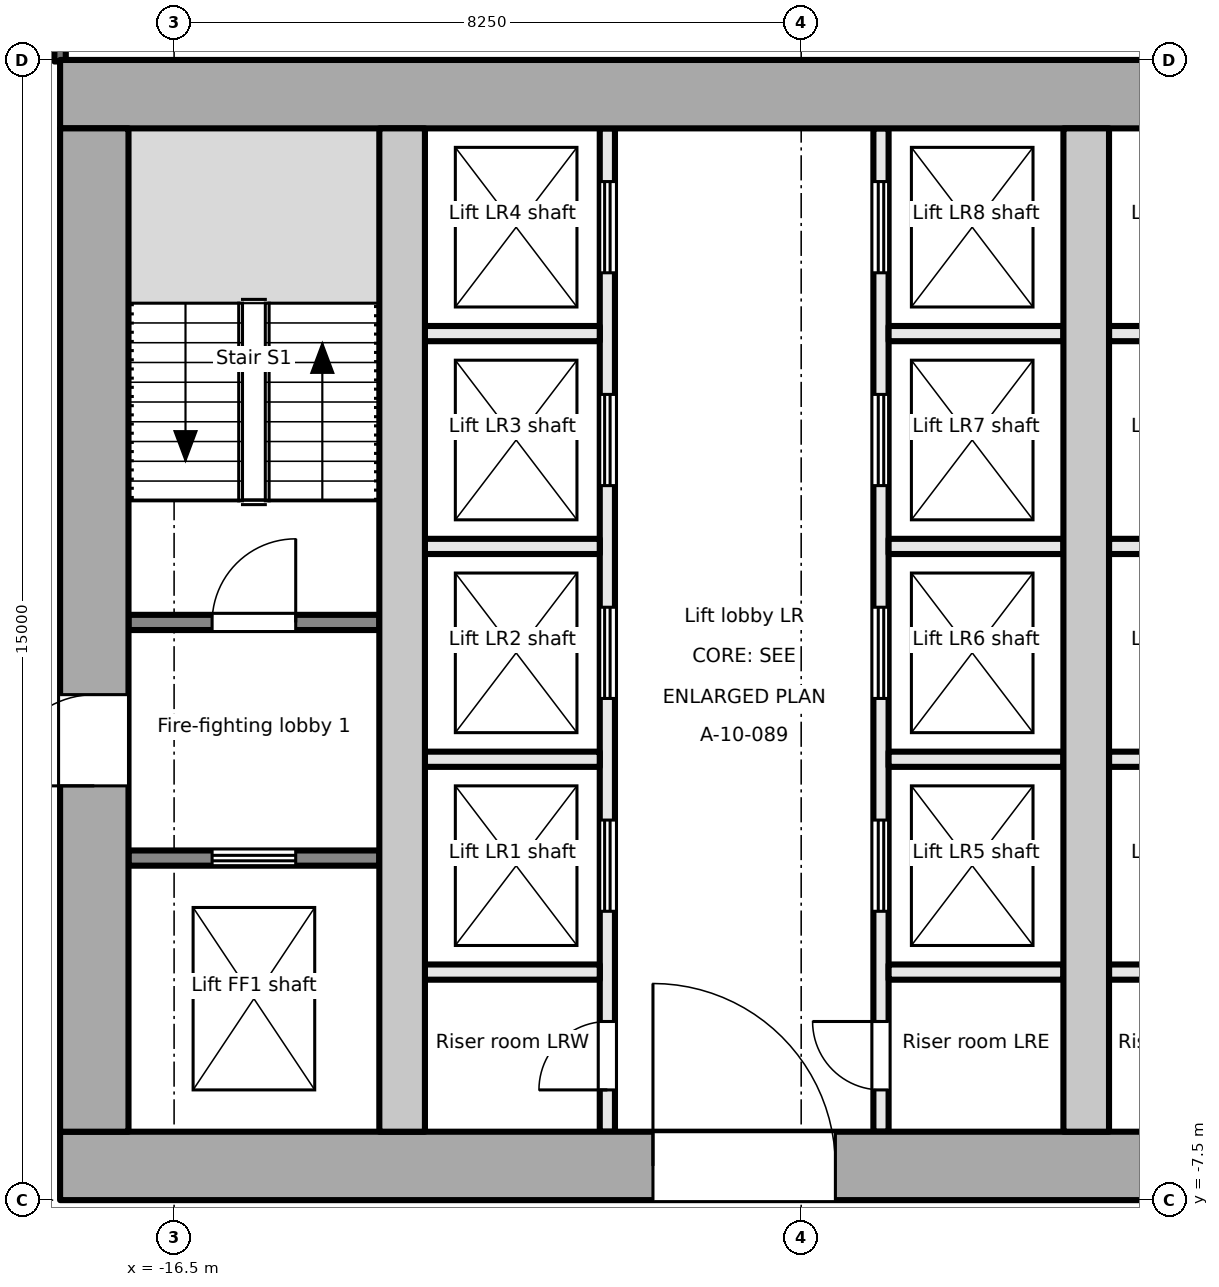
"""IFC4 building model, lengths in metres.
Left out: names, types, materials, properties, quantities, classifications, styles, units other than length and angle.
Written with IfcOpenShell. Run it as: python <this file> out.ifc"""

import sys

from ifc_helpers import new_model, si_unit, direction, frame, frame_2d, origin, place, context, subcontext, project, spatial, rectangle, extrude, element, fill, save


model = new_model("IFC4")
c1 = context("Model", 3, precision=1e-05, world=origin(), true_north=direction((0.0, 1.0)))
c2 = subcontext(c1, "Body", "Model", "MODEL_VIEW")
j1 = project(units=[si_unit("LENGTHUNIT", "METRE"), si_unit("PLANEANGLEUNIT", "RADIAN")], contexts=[c1])
p1 = place(None, origin())
s1 = spatial("IfcSite", under=j1, at=p1, CompositionType="ELEMENT")
p2 = place(p1, origin())
s2 = spatial("IfcBuilding", under=s1, at=p2, CompositionType="ELEMENT")
p3 = place(p2, frame((0.0, 0.0, 57.0)))
s3 = spatial("IfcBuildingStorey", under=s2, at=p3, CompositionType="ELEMENT", Elevation=57.0)
p4 = place(p3, frame((-18.0, -7.05, -0.2), z_axis=(0.0, 0.0, 1.0), x_axis=(1.0, 0.0, 0.0)))
e1 = element("IfcWall", 1, at=p4, inside=s3, PredefinedType="SHEAR", context=c2, shape_type="SweptSolid", body=[
    extrude(rectangle(XDim=36.0, YDim=0.9, at=frame_2d((18.0, 0.0))), origin(), (0.0, 0.0, 1.0), 4.1),
])
p5 = place(p4, frame((7.8, 0.0, 0.2)))
e2 = element("IfcOpeningElement", 2, at=p5, cuts=e1, PredefinedType="OPENING", context=c2, shape_type="SweptSolid", body=[
    extrude(rectangle(XDim=2.4, YDim=2.1, at=frame_2d((1.2, 1.05))), frame((0.0, 0.46, 0.0), z_axis=(0.0, -1.0, 0.0), x_axis=(1.0, 0.0, 0.0)), (0.0, 0.0, 1.0), 0.921),
])
p6 = place(p4, frame((17.4, 0.0, 0.2)))
e3 = element("IfcOpeningElement", 3, at=p6, cuts=e1, PredefinedType="OPENING", context=c2, shape_type="SweptSolid", body=[
    extrude(rectangle(XDim=1.2, YDim=2.1, at=frame_2d((0.6, 1.05))), frame((0.0, 0.46, 0.0), z_axis=(0.0, -1.0, 0.0), x_axis=(1.0, 0.0, 0.0)), (0.0, 0.0, 1.0), 0.921),
])
p7 = place(p4, frame((26.1, 0.0, 0.2)))
e4 = element("IfcOpeningElement", 4, at=p7, cuts=e1, PredefinedType="OPENING", context=c2, shape_type="SweptSolid", body=[
    extrude(rectangle(XDim=2.4, YDim=2.1, at=frame_2d((1.2, 1.05))), frame((0.0, 0.46, 0.0), z_axis=(0.0, -1.0, 0.0), x_axis=(1.0, 0.0, 0.0)), (0.0, 0.0, 1.0), 0.921),
])
p8 = place(p3, frame((-18.0, 7.05, -0.2), z_axis=(0.0, 0.0, 1.0), x_axis=(1.0, 0.0, 0.0)))
e5 = element("IfcWall", 5, at=p8, inside=s3, PredefinedType="SHEAR", context=c2, shape_type="SweptSolid", body=[
    extrude(rectangle(XDim=36.0, YDim=0.9, at=frame_2d((18.0, 0.0))), origin(), (0.0, 0.0, 1.0), 4.1),
])
p9 = place(p3, frame((-17.55, -6.6, -0.2), z_axis=(0.0, 0.0, 1.0), x_axis=(0.0, 1.0, 0.0)))
e6 = element("IfcWall", 6, at=p9, inside=s3, PredefinedType="SHEAR", context=c2, shape_type="SweptSolid", body=[
    extrude(rectangle(XDim=13.2, YDim=0.9, at=frame_2d((6.6, 0.0))), origin(), (0.0, 0.0, 1.0), 4.1),
])
p10 = place(p9, frame((4.55, 0.0, 0.2)))
e7 = element("IfcOpeningElement", 7, at=p10, cuts=e6, PredefinedType="OPENING", context=c2, shape_type="SweptSolid", body=[
    extrude(rectangle(XDim=1.2, YDim=2.1, at=frame_2d((0.6, 1.05))), frame((0.0, 0.46, 0.0), z_axis=(0.0, -1.0, 0.0), x_axis=(1.0, 0.0, 0.0)), (0.0, 0.0, 1.0), 0.921),
])
for number, where, z_axis, x_axis in (
    (8, (-13.5, -6.6, -0.2), (0.0, 0.0, 1.0), (0.0, 1.0, 0.0)),
    (9, (-4.5, -6.6, -0.2), (0.0, 0.0, 1.0), (0.0, 1.0, 0.0)),
):
    element("IfcWall", number, at=place(p3, frame(where, z_axis=z_axis, x_axis=x_axis)), inside=s3, PredefinedType="SHEAR", context=c2, shape_type="SweptSolid", body=[
        extrude(rectangle(XDim=13.2, YDim=0.6, at=frame_2d((6.6, 0.0))), origin(), (0.0, 0.0, 1.0), 4.1),
    ])
p11 = place(p3, frame((-17.1, -3.0, 0.0), z_axis=(0.0, 0.0, 1.0), x_axis=(1.0, 0.0, 0.0)))
e10 = element("IfcWall", 10, at=p11, inside=s3, PredefinedType="PARTITIONING", context=c2, shape_type="SweptSolid", body=[
    extrude(rectangle(XDim=3.3, YDim=0.2, at=frame_2d((1.65, 0.0))), origin(), (0.0, 0.0, 1.0), 3.9),
])
p12 = place(p11, frame((1.1, 0.0, 0.0)))
e11 = element("IfcOpeningElement", 11, at=p12, cuts=e10, PredefinedType="OPENING", context=c2, shape_type="SweptSolid", body=[
    extrude(rectangle(XDim=1.1, YDim=2.1, at=frame_2d((0.55, 1.05))), frame((0.0, 0.111, 0.0), z_axis=(0.0, -1.0, 0.0), x_axis=(1.0, 0.0, 0.0)), (0.0, 0.0, 1.0), 0.221),
])
p13 = place(p3, frame((-17.1, 0.1, 0.0), z_axis=(0.0, 0.0, 1.0), x_axis=(1.0, 0.0, 0.0)))
e12 = element("IfcWall", 12, at=p13, inside=s3, PredefinedType="PARTITIONING", context=c2, shape_type="SweptSolid", body=[
    extrude(rectangle(XDim=3.3, YDim=0.2, at=frame_2d((1.65, 0.0))), origin(), (0.0, 0.0, 1.0), 3.9),
])
p14 = place(p13, frame((1.1, 0.0, 0.0)))
e13 = element("IfcOpeningElement", 13, at=p14, cuts=e12, PredefinedType="OPENING", context=c2, shape_type="SweptSolid", body=[
    extrude(rectangle(XDim=1.1, YDim=2.1, at=frame_2d((0.55, 1.05))), frame((0.0, 0.111, 0.0), z_axis=(0.0, -1.0, 0.0), x_axis=(1.0, 0.0, 0.0)), (0.0, 0.0, 1.0), 0.221),
])
p15 = place(p3, frame((-10.8, -6.6, 0.0), z_axis=(0.0, 0.0, 1.0), x_axis=(0.0, 1.0, 0.0)))
e14 = element("IfcWall", 14, at=p15, inside=s3, PredefinedType="PARTITIONING", context=c2, shape_type="SweptSolid", body=[
    extrude(rectangle(XDim=13.2, YDim=0.2, at=frame_2d((6.6, 0.0))), origin(), (0.0, 0.0, 1.0), 3.9),
])
p16 = place(p15, frame((0.55, 0.0, 0.0)))
e15 = element("IfcOpeningElement", 15, at=p16, cuts=e14, PredefinedType="OPENING", context=c2, shape_type="SweptSolid", body=[
    extrude(rectangle(XDim=0.9, YDim=2.1, at=frame_2d((0.45, 1.05))), frame((0.0, 0.111, 0.0), z_axis=(0.0, -1.0, 0.0), x_axis=(1.0, 0.0, 0.0)), (0.0, 0.0, 1.0), 0.221),
])
p17 = place(p15, frame((2.9, 0.0, 0.0)))
e16 = element("IfcOpeningElement", 16, at=p17, cuts=e14, PredefinedType="OPENING", context=c2, shape_type="SweptSolid", body=[
    extrude(rectangle(XDim=1.2, YDim=2.1, at=frame_2d((0.6, 1.05))), frame((0.0, 0.111, 0.0), z_axis=(0.0, -1.0, 0.0), x_axis=(1.0, 0.0, 0.0)), (0.0, 0.0, 1.0), 0.221),
])
p18 = place(p15, frame((5.7, 0.0, 0.0)))
e17 = element("IfcOpeningElement", 17, at=p18, cuts=e14, PredefinedType="OPENING", context=c2, shape_type="SweptSolid", body=[
    extrude(rectangle(XDim=1.2, YDim=2.1, at=frame_2d((0.6, 1.05))), frame((0.0, 0.111, 0.0), z_axis=(0.0, -1.0, 0.0), x_axis=(1.0, 0.0, 0.0)), (0.0, 0.0, 1.0), 0.221),
])
p19 = place(p15, frame((8.5, 0.0, 0.0)))
e18 = element("IfcOpeningElement", 18, at=p19, cuts=e14, PredefinedType="OPENING", context=c2, shape_type="SweptSolid", body=[
    extrude(rectangle(XDim=1.2, YDim=2.1, at=frame_2d((0.6, 1.05))), frame((0.0, 0.111, 0.0), z_axis=(0.0, -1.0, 0.0), x_axis=(1.0, 0.0, 0.0)), (0.0, 0.0, 1.0), 0.221),
])
p20 = place(p15, frame((11.3, 0.0, 0.0)))
e19 = element("IfcOpeningElement", 19, at=p20, cuts=e14, PredefinedType="OPENING", context=c2, shape_type="SweptSolid", body=[
    extrude(rectangle(XDim=1.2, YDim=2.1, at=frame_2d((0.6, 1.05))), frame((0.0, 0.111, 0.0), z_axis=(0.0, -1.0, 0.0), x_axis=(1.0, 0.0, 0.0)), (0.0, 0.0, 1.0), 0.221),
])
p21 = place(p3, frame((-7.2, -6.6, 0.0), z_axis=(0.0, 0.0, 1.0), x_axis=(0.0, 1.0, 0.0)))
e20 = element("IfcWall", 20, at=p21, inside=s3, PredefinedType="PARTITIONING", context=c2, shape_type="SweptSolid", body=[
    extrude(rectangle(XDim=13.2, YDim=0.2, at=frame_2d((6.6, 0.0))), origin(), (0.0, 0.0, 1.0), 3.9),
])
p22 = place(p21, frame((0.55, 0.0, 0.0)))
e21 = element("IfcOpeningElement", 21, at=p22, cuts=e20, PredefinedType="OPENING", context=c2, shape_type="SweptSolid", body=[
    extrude(rectangle(XDim=0.9, YDim=2.1, at=frame_2d((0.45, 1.05))), frame((0.0, 0.111, 0.0), z_axis=(0.0, -1.0, 0.0), x_axis=(1.0, 0.0, 0.0)), (0.0, 0.0, 1.0), 0.221),
])
p23 = place(p21, frame((2.9, 0.0, 0.0)))
e22 = element("IfcOpeningElement", 22, at=p23, cuts=e20, PredefinedType="OPENING", context=c2, shape_type="SweptSolid", body=[
    extrude(rectangle(XDim=1.2, YDim=2.1, at=frame_2d((0.6, 1.05))), frame((0.0, 0.111, 0.0), z_axis=(0.0, -1.0, 0.0), x_axis=(1.0, 0.0, 0.0)), (0.0, 0.0, 1.0), 0.221),
])
p24 = place(p21, frame((5.7, 0.0, 0.0)))
e23 = element("IfcOpeningElement", 23, at=p24, cuts=e20, PredefinedType="OPENING", context=c2, shape_type="SweptSolid", body=[
    extrude(rectangle(XDim=1.2, YDim=2.1, at=frame_2d((0.6, 1.05))), frame((0.0, 0.111, 0.0), z_axis=(0.0, -1.0, 0.0), x_axis=(1.0, 0.0, 0.0)), (0.0, 0.0, 1.0), 0.221),
])
p25 = place(p21, frame((8.5, 0.0, 0.0)))
e24 = element("IfcOpeningElement", 24, at=p25, cuts=e20, PredefinedType="OPENING", context=c2, shape_type="SweptSolid", body=[
    extrude(rectangle(XDim=1.2, YDim=2.1, at=frame_2d((0.6, 1.05))), frame((0.0, 0.111, 0.0), z_axis=(0.0, -1.0, 0.0), x_axis=(1.0, 0.0, 0.0)), (0.0, 0.0, 1.0), 0.221),
])
p26 = place(p21, frame((11.3, 0.0, 0.0)))
e25 = element("IfcOpeningElement", 25, at=p26, cuts=e20, PredefinedType="OPENING", context=c2, shape_type="SweptSolid", body=[
    extrude(rectangle(XDim=1.2, YDim=2.1, at=frame_2d((0.6, 1.05))), frame((0.0, 0.111, 0.0), z_axis=(0.0, -1.0, 0.0), x_axis=(1.0, 0.0, 0.0)), (0.0, 0.0, 1.0), 0.221),
])
for number, where, z_axis, x_axis in (
    (26, (-13.2, -1.7, 0.0), (0.0, 0.0, 1.0), (1.0, 0.0, 0.0)),
    (27, (-13.2, 1.1, 0.0), (0.0, 0.0, 1.0), (1.0, 0.0, 0.0)),
    (28, (-13.2, 3.9, 0.0), (0.0, 0.0, 1.0), (1.0, 0.0, 0.0)),
    (29, (-13.2, -4.5, 0.0), (0.0, 0.0, 1.0), (1.0, 0.0, 0.0)),
    (30, (-7.1, -1.7, 0.0), (0.0, 0.0, 1.0), (1.0, 0.0, 0.0)),
    (31, (-7.1, 1.1, 0.0), (0.0, 0.0, 1.0), (1.0, 0.0, 0.0)),
    (32, (-7.1, 3.9, 0.0), (0.0, 0.0, 1.0), (1.0, 0.0, 0.0)),
    (33, (-7.1, -4.5, 0.0), (0.0, 0.0, 1.0), (1.0, 0.0, 0.0)),
    (34, (-4.2, -1.7, 0.0), (0.0, 0.0, 1.0), (1.0, 0.0, 0.0)),
    (35, (-4.2, 1.1, 0.0), (0.0, 0.0, 1.0), (1.0, 0.0, 0.0)),
    (36, (-4.2, 3.9, 0.0), (0.0, 0.0, 1.0), (1.0, 0.0, 0.0)),
    (37, (-4.2, -4.5, 0.0), (0.0, 0.0, 1.0), (1.0, 0.0, 0.0)),
):
    element("IfcWall", number, at=place(p3, frame(where, z_axis=z_axis, x_axis=x_axis)), inside=s3, PredefinedType="PARTITIONING", context=c2, shape_type="SweptSolid", body=[
        extrude(rectangle(XDim=2.3, YDim=0.2, at=frame_2d((1.15, 0.0))), origin(), (0.0, 0.0, 1.0), 3.9),
    ])
p27 = place(p3, frame((-18.0, 9.74, 0.0), z_axis=(0.0, 0.0, 1.0), x_axis=(0.0, -1.0, 0.0)))
e38 = element("IfcWall", 38, at=p27, inside=s3, PredefinedType="PARTITIONING", context=c2, shape_type="SweptSolid", body=[
    extrude(rectangle(XDim=2.26, YDim=0.15, at=frame_2d((1.13, 0.0))), origin(), (0.0, 0.0, 1.0), 2.9),
])
p28 = place(p27, frame((0.895, 0.0, 0.0)))
e39 = element("IfcOpeningElement", 39, at=p28, cuts=e38, PredefinedType="OPENING", context=c2, shape_type="SweptSolid", body=[
    extrude(rectangle(XDim=0.9, YDim=2.1, at=frame_2d((0.45, 1.05))), frame((0.0, 0.085, 0.0), z_axis=(0.0, -1.0, 0.0), x_axis=(1.0, 0.0, 0.0)), (0.0, 0.0, 1.0), 0.171),
])
p29 = place(p12, origin())
e40 = element("IfcDoor", 40, at=p29, inside=s3, OperationType="DOUBLE_DOOR_SLIDING", PredefinedType="DOOR", context=c2, shape_type="SweptSolid", body=[
    extrude(rectangle(XDim=1.1, YDim=2.1, at=frame_2d((0.55, 1.05))), frame((0.0, 0.025, 0.0), z_axis=(0.0, -1.0, 0.0), x_axis=(1.0, 0.0, 0.0)), (0.0, 0.0, 1.0), 0.05),
])
fill(e11, e40)
p30 = place(p10, origin())
e41 = element("IfcDoor", 41, at=p30, inside=s3, OperationType="SINGLE_SWING_LEFT", PredefinedType="DOOR", context=c2, shape_type="SweptSolid", body=[
    extrude(rectangle(XDim=1.2, YDim=2.1, at=frame_2d((0.6, 1.05))), frame((0.0, 0.025, 0.0), z_axis=(0.0, -1.0, 0.0), x_axis=(1.0, 0.0, 0.0)), (0.0, 0.0, 1.0), 0.05),
])
fill(e7, e41)
p31 = place(p14, origin())
e42 = element("IfcDoor", 42, at=p31, inside=s3, OperationType="SINGLE_SWING_RIGHT", PredefinedType="DOOR", context=c2, shape_type="SweptSolid", body=[
    extrude(rectangle(XDim=1.1, YDim=2.1, at=frame_2d((0.55, 1.05))), frame((0.0, 0.025, 0.0), z_axis=(0.0, -1.0, 0.0), x_axis=(1.0, 0.0, 0.0)), (0.0, 0.0, 1.0), 0.05),
])
fill(e13, e42)
p32 = place(p16, origin())
e43 = element("IfcDoor", 43, at=p32, inside=s3, OperationType="SINGLE_SWING_LEFT", PredefinedType="DOOR", context=c2, shape_type="SweptSolid", body=[
    extrude(rectangle(XDim=0.9, YDim=2.1, at=frame_2d((0.45, 1.05))), frame((0.0, 0.025, 0.0), z_axis=(0.0, -1.0, 0.0), x_axis=(1.0, 0.0, 0.0)), (0.0, 0.0, 1.0), 0.05),
])
fill(e15, e43)
p33 = place(p17, origin())
e44 = element("IfcDoor", 44, at=p33, inside=s3, OperationType="DOUBLE_DOOR_SLIDING", PredefinedType="DOOR", context=c2, shape_type="SweptSolid", body=[
    extrude(rectangle(XDim=1.2, YDim=2.1, at=frame_2d((0.6, 1.05))), frame((0.0, 0.025, 0.0), z_axis=(0.0, -1.0, 0.0), x_axis=(1.0, 0.0, 0.0)), (0.0, 0.0, 1.0), 0.05),
])
fill(e16, e44)
p34 = place(p18, origin())
e45 = element("IfcDoor", 45, at=p34, inside=s3, OperationType="DOUBLE_DOOR_SLIDING", PredefinedType="DOOR", context=c2, shape_type="SweptSolid", body=[
    extrude(rectangle(XDim=1.2, YDim=2.1, at=frame_2d((0.6, 1.05))), frame((0.0, 0.025, 0.0), z_axis=(0.0, -1.0, 0.0), x_axis=(1.0, 0.0, 0.0)), (0.0, 0.0, 1.0), 0.05),
])
fill(e17, e45)
p35 = place(p19, origin())
e46 = element("IfcDoor", 46, at=p35, inside=s3, OperationType="DOUBLE_DOOR_SLIDING", PredefinedType="DOOR", context=c2, shape_type="SweptSolid", body=[
    extrude(rectangle(XDim=1.2, YDim=2.1, at=frame_2d((0.6, 1.05))), frame((0.0, 0.025, 0.0), z_axis=(0.0, -1.0, 0.0), x_axis=(1.0, 0.0, 0.0)), (0.0, 0.0, 1.0), 0.05),
])
fill(e18, e46)
p36 = place(p20, origin())
e47 = element("IfcDoor", 47, at=p36, inside=s3, OperationType="DOUBLE_DOOR_SLIDING", PredefinedType="DOOR", context=c2, shape_type="SweptSolid", body=[
    extrude(rectangle(XDim=1.2, YDim=2.1, at=frame_2d((0.6, 1.05))), frame((0.0, 0.025, 0.0), z_axis=(0.0, -1.0, 0.0), x_axis=(1.0, 0.0, 0.0)), (0.0, 0.0, 1.0), 0.05),
])
fill(e19, e47)
p37 = place(p22, origin())
e48 = element("IfcDoor", 48, at=p37, inside=s3, OperationType="SINGLE_SWING_RIGHT", PredefinedType="DOOR", context=c2, shape_type="SweptSolid", body=[
    extrude(rectangle(XDim=0.9, YDim=2.1, at=frame_2d((0.45, 1.05))), frame((0.0, 0.025, 0.0), z_axis=(0.0, -1.0, 0.0), x_axis=(1.0, 0.0, 0.0)), (0.0, 0.0, 1.0), 0.05),
])
fill(e21, e48)
p38 = place(p23, origin())
e49 = element("IfcDoor", 49, at=p38, inside=s3, OperationType="DOUBLE_DOOR_SLIDING", PredefinedType="DOOR", context=c2, shape_type="SweptSolid", body=[
    extrude(rectangle(XDim=1.2, YDim=2.1, at=frame_2d((0.6, 1.05))), frame((0.0, 0.025, 0.0), z_axis=(0.0, -1.0, 0.0), x_axis=(1.0, 0.0, 0.0)), (0.0, 0.0, 1.0), 0.05),
])
fill(e22, e49)
p39 = place(p24, origin())
e50 = element("IfcDoor", 50, at=p39, inside=s3, OperationType="DOUBLE_DOOR_SLIDING", PredefinedType="DOOR", context=c2, shape_type="SweptSolid", body=[
    extrude(rectangle(XDim=1.2, YDim=2.1, at=frame_2d((0.6, 1.05))), frame((0.0, 0.025, 0.0), z_axis=(0.0, -1.0, 0.0), x_axis=(1.0, 0.0, 0.0)), (0.0, 0.0, 1.0), 0.05),
])
fill(e23, e50)
p40 = place(p25, origin())
e51 = element("IfcDoor", 51, at=p40, inside=s3, OperationType="DOUBLE_DOOR_SLIDING", PredefinedType="DOOR", context=c2, shape_type="SweptSolid", body=[
    extrude(rectangle(XDim=1.2, YDim=2.1, at=frame_2d((0.6, 1.05))), frame((0.0, 0.025, 0.0), z_axis=(0.0, -1.0, 0.0), x_axis=(1.0, 0.0, 0.0)), (0.0, 0.0, 1.0), 0.05),
])
fill(e24, e51)
p41 = place(p26, origin())
e52 = element("IfcDoor", 52, at=p41, inside=s3, OperationType="DOUBLE_DOOR_SLIDING", PredefinedType="DOOR", context=c2, shape_type="SweptSolid", body=[
    extrude(rectangle(XDim=1.2, YDim=2.1, at=frame_2d((0.6, 1.05))), frame((0.0, 0.025, 0.0), z_axis=(0.0, -1.0, 0.0), x_axis=(1.0, 0.0, 0.0)), (0.0, 0.0, 1.0), 0.05),
])
fill(e25, e52)
p42 = place(p5, origin())
e53 = element("IfcDoor", 53, at=p42, inside=s3, OperationType="DOUBLE_DOOR_DOUBLE_SWING", PredefinedType="DOOR", context=c2, shape_type="SweptSolid", body=[
    extrude(rectangle(XDim=2.4, YDim=2.1, at=frame_2d((1.2, 1.05))), frame((0.0, 0.025, 0.0), z_axis=(0.0, -1.0, 0.0), x_axis=(1.0, 0.0, 0.0)), (0.0, 0.0, 1.0), 0.05),
])
fill(e2, e53)
save(model, sys.argv[1])
